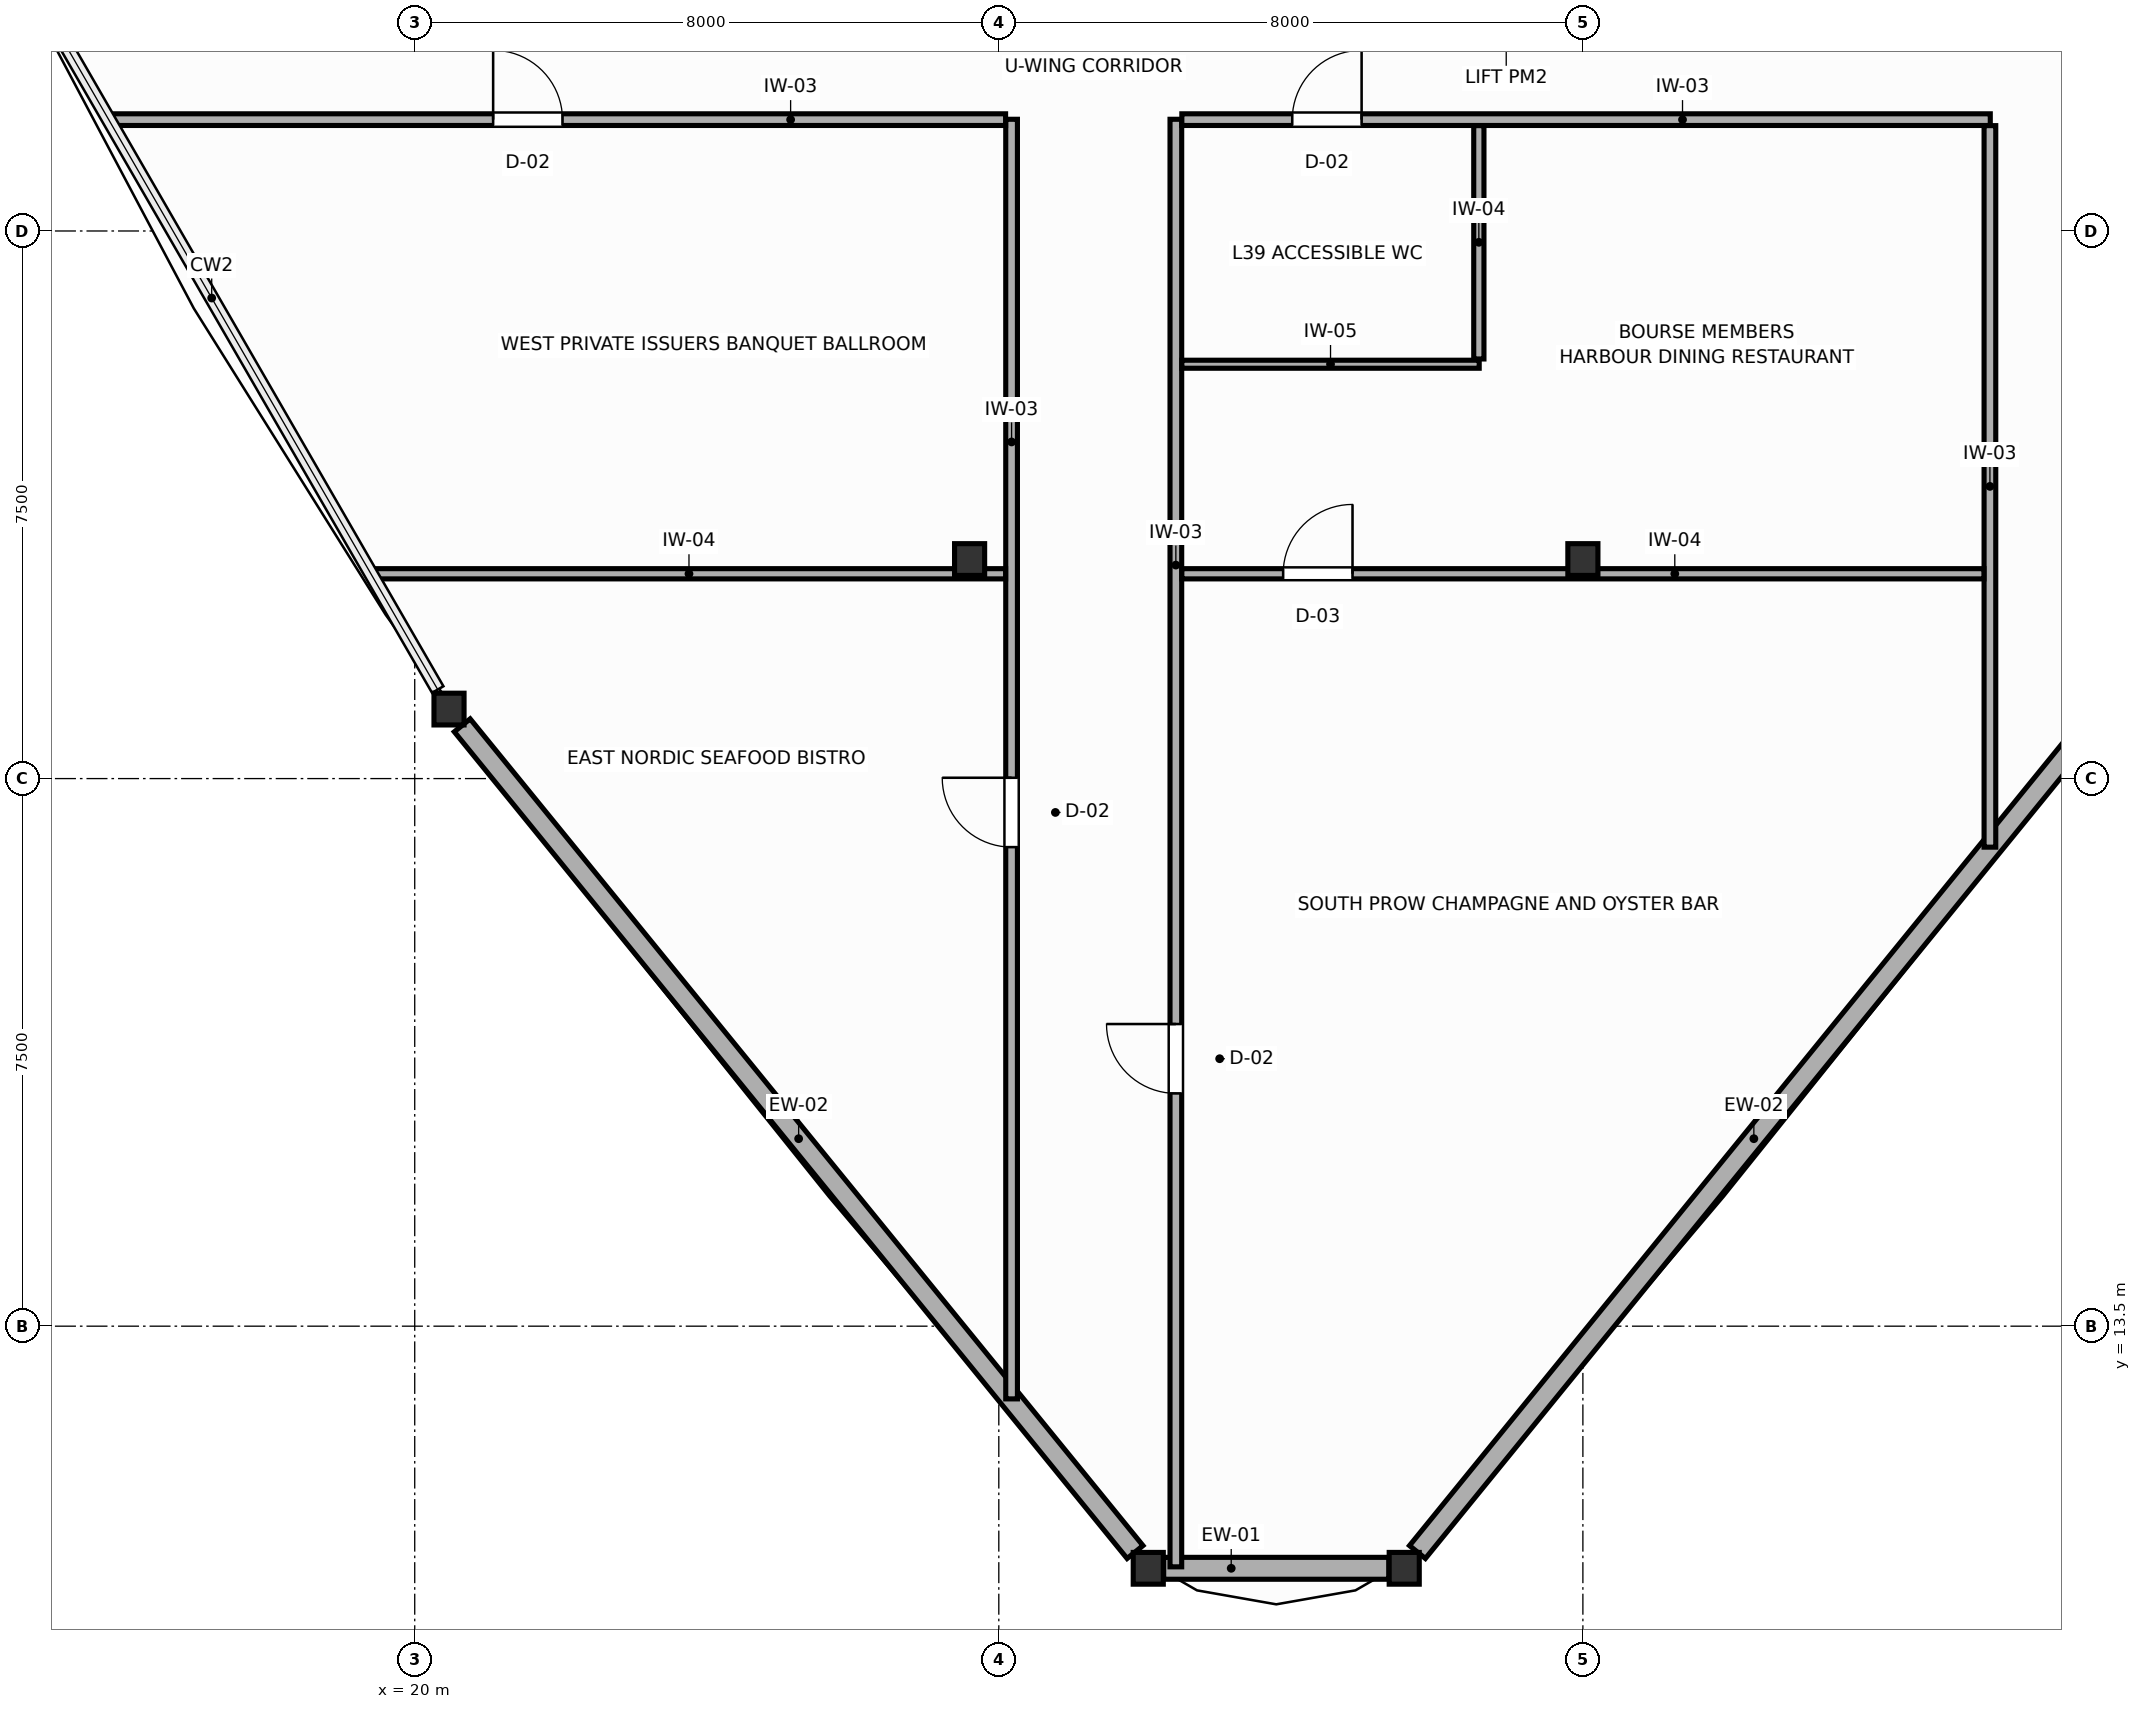
"""IFC4 building model, lengths in metres.
Left out: names, types, materials, properties, quantities, classifications, styles, units other than length and angle.
Written with IfcOpenShell. Run it as: python <this file> out.ifc"""

import sys

from ifc_helpers import new_model, si_unit, direction, frame, frame_2d, origin, origin_2d, place, context, subcontext, project, spatial, rectangle, i_section, extrude, source, transform, mapped, element, fill, save


model = new_model("IFC4")
c1 = context("Model", 3, precision=1e-05, world=origin(), true_north=direction((0.0, 1.0)))
c2 = subcontext(c1, "Body", "Model", "MODEL_VIEW")
j1 = project(units=[si_unit("LENGTHUNIT", "METRE"), si_unit("PLANEANGLEUNIT", "RADIAN")], contexts=[c1])
p1 = place(None, origin())
s1 = spatial("IfcSite", under=j1, at=p1, CompositionType="ELEMENT")
p2 = place(p1, origin())
s2 = spatial("IfcBuilding", under=s1, at=p2, CompositionType="ELEMENT")
p3 = place(p2, frame((0.0, 0.0, 154.2)))
s3 = spatial("IfcBuildingStorey", under=s2, at=p3, CompositionType="ELEMENT", Elevation=154.2)
m1 = source(origin(), c2, "Body", "SweptSolid", [
    extrude(i_section(OverallWidth=0.412, OverallDepth=0.435, WebThickness=0.033, FlangeThickness=0.053, FilletRadius=0.015, at=origin_2d()), origin(), (0.0, 0.0, 1.0), 3.6),
])
for number, where, z_axis, x_axis in (
    (1, (27.6, 24.0, 0.0), (0.0, 0.0, 1.0), (1.0, 0.0, 0.0)),
    (2, (36.0, 24.0, 0.0), (0.0, 0.0, 1.0), (1.0, 0.0, 0.0)),
    (3, (20.469, 21.952, 0.0), (0.0, 0.0, 1.0), (1.0, 0.0, 0.0)),
    (4, (30.047, 10.184, 0.0), (0.0, 0.0, 1.0), (1.0, 0.0, 0.0)),
    (5, (33.553, 10.184, 0.0), (0.0, 0.0, 1.0), (1.0, 0.0, 0.0)),
):
    element("IfcColumn", number, at=place(p3, frame(where, z_axis=z_axis, x_axis=x_axis)), inside=s3, PredefinedType="COLUMN", context=c2, shape_type="MappedRepresentation", body=[
        mapped(m1, transform((0.0, 0.0, 0.0), scale=1.0)),
    ])
p4 = place(p3, frame((20.651, 21.729, 0.0), z_axis=(0.0, 0.0, 1.0), x_axis=(0.631219465915, -0.775604271423, 0.0)))
e6 = element("IfcWall", 6, at=p4, inside=s3, PredefinedType="SOLIDWALL", context=c2, shape_type="SweptSolid", body=[
    extrude(rectangle(XDim=14.599, YDim=0.28, at=frame_2d((7.3, 0.0))), origin(), (0.0, 0.0, 1.0), 1.87),
])
p5 = place(p3, frame((30.258, 10.184, 0.0), z_axis=(0.0, 0.0, 1.0), x_axis=(1.0, 0.0, 0.0)))
e7 = element("IfcWall", 7, at=p5, inside=s3, PredefinedType="SOLIDWALL", context=c2, shape_type="SweptSolid", body=[
    extrude(rectangle(XDim=3.084, YDim=0.3, at=frame_2d((1.542, 0.0))), origin(), (0.0, 0.0, 1.0), 1.87),
])
p6 = place(p3, frame((33.734, 10.406, 0.0), z_axis=(0.0, 0.0, 1.0), x_axis=(0.631219465915, 0.775604271423, 0.0)))
e8 = element("IfcWall", 8, at=p6, inside=s3, PredefinedType="SOLIDWALL", context=c2, shape_type="SweptSolid", body=[
    extrude(rectangle(XDim=14.599, YDim=0.28, at=frame_2d((7.3, 0.0))), origin(), (0.0, 0.0, 1.0), 1.87),
])
p7 = place(p3, frame((30.425, 10.204, 0.0), z_axis=(0.0, 0.0, 1.0), x_axis=(0.0, 1.0, 0.0)))
e9 = element("IfcWall", 9, at=p7, inside=s3, PredefinedType="PARTITIONING", context=c2, shape_type="SweptSolid", body=[
    extrude(rectangle(XDim=19.826, YDim=0.16, at=frame_2d((9.913, 0.0))), origin(), (0.0, 0.0, 1.0), 3.4),
])
p8 = place(p7, frame((6.484, 0.0, 0.0)))
e10 = element("IfcOpeningElement", 10, at=p8, cuts=e9, PredefinedType="OPENING", context=c2, shape_type="SweptSolid", body=[
    extrude(rectangle(XDim=0.95, YDim=2.05, at=frame_2d((0.475, 1.025))), frame((0.0, 0.09, 0.0), z_axis=(0.0, -1.0, 0.0), x_axis=(1.0, 0.0, 0.0)), (0.0, 0.0, 1.0), 0.18),
])
p9 = place(p3, frame((28.175, 12.504, 0.0), z_axis=(0.0, 0.0, 1.0), x_axis=(0.0, 1.0, 0.0)))
e11 = element("IfcWall", 11, at=p9, inside=s3, PredefinedType="PARTITIONING", context=c2, shape_type="SweptSolid", body=[
    extrude(rectangle(XDim=17.526, YDim=0.16, at=frame_2d((8.763, 0.0))), origin(), (0.0, 0.0, 1.0), 3.4),
])
p10 = place(p9, frame((7.557, 0.0, 0.0)))
e12 = element("IfcOpeningElement", 12, at=p10, cuts=e11, PredefinedType="OPENING", context=c2, shape_type="SweptSolid", body=[
    extrude(rectangle(XDim=0.95, YDim=2.05, at=frame_2d((0.475, 1.025))), frame((0.0, 0.09, 0.0), z_axis=(0.0, -1.0, 0.0), x_axis=(1.0, 0.0, 0.0)), (0.0, 0.0, 1.0), 0.18),
])
p11 = place(p3, frame((15.829, 30.025, 0.0), z_axis=(0.0, 0.0, 1.0), x_axis=(1.0, 0.0, 0.0)))
e13 = element("IfcWall", 13, at=p11, inside=s3, PredefinedType="PARTITIONING", context=c2, shape_type="SweptSolid", body=[
    extrude(rectangle(XDim=12.264, YDim=0.16, at=frame_2d((6.132, 0.0))), origin(), (0.0, 0.0, 1.0), 3.4),
])
p12 = place(p11, frame((5.245, 0.0, 0.0)))
e14 = element("IfcOpeningElement", 14, at=p12, cuts=e13, PredefinedType="OPENING", context=c2, shape_type="SweptSolid", body=[
    extrude(rectangle(XDim=0.95, YDim=2.05, at=frame_2d((0.475, 1.025))), frame((0.0, 0.09, 0.0), z_axis=(0.0, -1.0, 0.0), x_axis=(1.0, 0.0, 0.0)), (0.0, 0.0, 1.0), 0.18),
])
p13 = place(p3, frame((30.507, 30.025, 0.0), z_axis=(0.0, 0.0, 1.0), x_axis=(1.0, 0.0, 0.0)))
e15 = element("IfcWall", 15, at=p13, inside=s3, PredefinedType="PARTITIONING", context=c2, shape_type="SweptSolid", body=[
    extrude(rectangle(XDim=11.073, YDim=0.16, at=frame_2d((5.537, 0.0))), origin(), (0.0, 0.0, 1.0), 3.4),
])
p14 = place(p13, frame((1.512, 0.0, 0.0)))
e16 = element("IfcOpeningElement", 16, at=p14, cuts=e15, PredefinedType="OPENING", context=c2, shape_type="SweptSolid", body=[
    extrude(rectangle(XDim=0.95, YDim=2.05, at=frame_2d((0.475, 1.025))), frame((0.0, 0.09, 0.0), z_axis=(0.0, -1.0, 0.0), x_axis=(1.0, 0.0, 0.0)), (0.0, 0.0, 1.0), 0.18),
])
p15 = place(p3, frame((41.575, 20.061, 0.0), z_axis=(0.0, 0.0, 1.0), x_axis=(0.0, 1.0, 0.0)))
e17 = element("IfcWall", 17, at=p15, inside=s3, PredefinedType="PARTITIONING", context=c2, shape_type="SweptSolid", body=[
    extrude(rectangle(XDim=9.882, YDim=0.16, at=frame_2d((4.941, 0.0))), origin(), (0.0, 0.0, 1.0), 3.4),
])
p16 = place(p3, frame((30.507, 23.805, 0.0), z_axis=(0.0, 0.0, 1.0), x_axis=(1.0, 0.0, 0.0)))
e18 = element("IfcWall", 18, at=p16, inside=s3, PredefinedType="PARTITIONING", context=c2, shape_type="SweptSolid", body=[
    extrude(rectangle(XDim=10.986, YDim=0.14, at=frame_2d((5.493, 0.0))), origin(), (0.0, 0.0, 1.0), 2.16),
])
p17 = place(p16, frame((1.388, 0.0, 0.0)))
e19 = element("IfcOpeningElement", 19, at=p17, cuts=e18, PredefinedType="OPENING", context=c2, shape_type="SweptSolid", body=[
    extrude(rectangle(XDim=0.95, YDim=2.05, at=frame_2d((0.475, 1.025))), frame((0.0, 0.08, 0.0), z_axis=(0.0, -1.0, 0.0), x_axis=(1.0, 0.0, 0.0)), (0.0, 0.0, 1.0), 0.16),
])
p18 = place(p3, frame((19.42, 23.805, 0.0), z_axis=(0.0, 0.0, 1.0), x_axis=(1.0, 0.0, 0.0)))
e20 = element("IfcWall", 20, at=p18, inside=s3, PredefinedType="PARTITIONING", context=c2, shape_type="SweptSolid", body=[
    extrude(rectangle(XDim=8.673, YDim=0.14, at=frame_2d((4.337, 0.0))), origin(), (0.0, 0.0, 1.0), 2.16),
])
p19 = place(p3, frame((30.507, 26.675, 0.0), z_axis=(0.0, 0.0, 1.0), x_axis=(1.0, 0.0, 0.0)))
e21 = element("IfcWall", 21, at=p19, inside=s3, PredefinedType="MOVABLE", context=c2, shape_type="SweptSolid", body=[
    extrude(rectangle(XDim=4.073, YDim=0.11, at=frame_2d((2.037, 0.0))), origin(), (0.0, 0.0, 1.0), 3.4),
])
p20 = place(p3, frame((34.575, 26.747, 0.0), z_axis=(0.0, 0.0, 1.0), x_axis=(0.0, 1.0, 0.0)))
e22 = element("IfcWall", 22, at=p20, inside=s3, PredefinedType="PARTITIONING", context=c2, shape_type="SweptSolid", body=[
    extrude(rectangle(XDim=3.196, YDim=0.14, at=frame_2d((1.598, 0.0))), origin(), (0.0, 0.0, 1.0), 3.4),
])
p21 = place(p8, origin())
e23 = element("IfcDoor", 23, at=p21, inside=s3, OperationType="SINGLE_SWING_RIGHT", PredefinedType="DOOR", context=c2, shape_type="SweptSolid", body=[
    extrude(rectangle(XDim=0.95, YDim=2.05, at=frame_2d((0.475, 1.025))), frame((0.0, 0.025, 0.0), z_axis=(0.0, -1.0, 0.0), x_axis=(1.0, 0.0, 0.0)), (0.0, 0.0, 1.0), 0.05),
])
fill(e10, e23)
p22 = place(p10, origin())
e24 = element("IfcDoor", 24, at=p22, inside=s3, OperationType="SINGLE_SWING_RIGHT", PredefinedType="DOOR", context=c2, shape_type="SweptSolid", body=[
    extrude(rectangle(XDim=0.95, YDim=2.05, at=frame_2d((0.475, 1.025))), frame((0.0, 0.025, 0.0), z_axis=(0.0, -1.0, 0.0), x_axis=(1.0, 0.0, 0.0)), (0.0, 0.0, 1.0), 0.05),
])
fill(e12, e24)
p23 = place(p12, origin())
e25 = element("IfcDoor", 25, at=p23, inside=s3, OperationType="SINGLE_SWING_LEFT", PredefinedType="DOOR", context=c2, shape_type="SweptSolid", body=[
    extrude(rectangle(XDim=0.95, YDim=2.05, at=frame_2d((0.475, 1.025))), frame((0.0, 0.025, 0.0), z_axis=(0.0, -1.0, 0.0), x_axis=(1.0, 0.0, 0.0)), (0.0, 0.0, 1.0), 0.05),
])
fill(e14, e25)
p24 = place(p14, origin())
e26 = element("IfcDoor", 26, at=p24, inside=s3, OperationType="SINGLE_SWING_RIGHT", PredefinedType="DOOR", context=c2, shape_type="SweptSolid", body=[
    extrude(rectangle(XDim=0.95, YDim=2.05, at=frame_2d((0.475, 1.025))), frame((0.0, 0.025, 0.0), z_axis=(0.0, -1.0, 0.0), x_axis=(1.0, 0.0, 0.0)), (0.0, 0.0, 1.0), 0.05),
])
fill(e16, e26)
p25 = place(p17, origin())
e27 = element("IfcDoor", 27, at=p25, inside=s3, OperationType="SINGLE_SWING_RIGHT", PredefinedType="DOOR", context=c2, shape_type="SweptSolid", body=[
    extrude(rectangle(XDim=0.95, YDim=2.05, at=frame_2d((0.475, 1.025))), frame((0.0, 0.025, 0.0), z_axis=(0.0, -1.0, 0.0), x_axis=(1.0, 0.0, 0.0)), (0.0, 0.0, 1.0), 0.05),
])
fill(e19, e27)
save(model, sys.argv[1])
